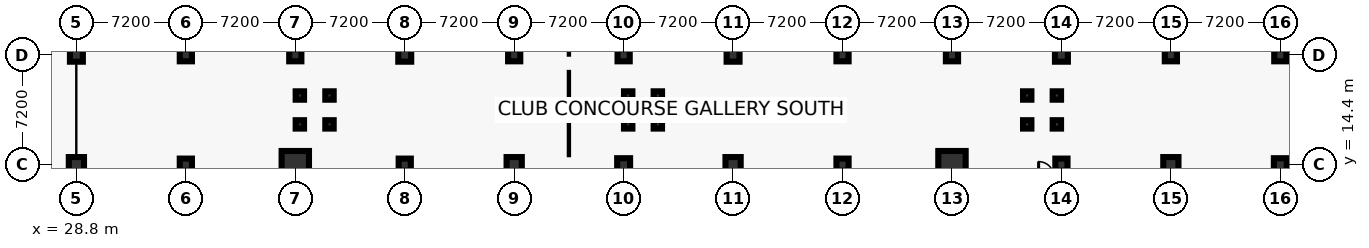
"""IFC4 building model, lengths in metres.
Left out: names, types, materials, properties, quantities, classifications, styles, units other than length and angle.
Written with IfcOpenShell. Run it as: python <this file> out.ifc"""

import sys

from ifc_helpers import new_model, si_unit, direction, frame, origin, origin_2d, place, context, subcontext, project, spatial, rectangle, circle, extrude, element, save


model = new_model("IFC4")
c1 = context("Model", 3, precision=1e-05, world=origin(), true_north=direction((0.0, 1.0)))
c2 = subcontext(c1, "Body", "Model", "MODEL_VIEW")
j1 = project(units=[si_unit("LENGTHUNIT", "METRE"), si_unit("PLANEANGLEUNIT", "RADIAN")], contexts=[c1])
p1 = place(None, origin())
s1 = spatial("IfcSite", under=j1, at=p1, CompositionType="ELEMENT")
p2 = place(p1, origin())
s2 = spatial("IfcBuilding", under=s1, at=p2, CompositionType="ELEMENT")
p3 = place(p2, frame((0.0, 0.0, 5.4)))
s3 = spatial("IfcBuildingStorey", under=s2, at=p3, CompositionType="ELEMENT", Elevation=5.4)
p4 = place(p3, frame((28.8, 14.4, 0.0), z_axis=(0.0, 0.0, 1.0), x_axis=(1.0, 0.0, 0.0)))
e1 = element("IfcColumn", 1, at=p4, inside=s3, PredefinedType="COLUMN", context=c2, shape_type="SweptSolid", body=[
    extrude(circle(Radius=0.5, at=origin_2d()), origin(), (0.0, 0.0, 1.0), 4.2),
])
p5 = place(p3, frame((28.8, 21.6, 0.0), z_axis=(0.0, 0.0, 1.0), x_axis=(1.0, 0.0, 0.0)))
e2 = element("IfcColumn", 2, at=p5, inside=s3, PredefinedType="COLUMN", context=c2, shape_type="SweptSolid", body=[
    extrude(rectangle(XDim=0.85, YDim=0.85, at=origin_2d()), origin(), (0.0, 0.0, 1.0), 4.2),
])
p6 = place(p3, frame((36.0, 14.4, 0.0), z_axis=(0.0, 0.0, 1.0), x_axis=(1.0, 0.0, 0.0)))
e3 = element("IfcColumn", 3, at=p6, inside=s3, PredefinedType="COLUMN", context=c2, shape_type="SweptSolid", body=[
    extrude(rectangle(XDim=0.8, YDim=0.8, at=origin_2d()), origin(), (0.0, 0.0, 1.0), 4.2),
])
p7 = place(p3, frame((36.0, 21.6, 0.0), z_axis=(0.0, 0.0, 1.0), x_axis=(1.0, 0.0, 0.0)))
e4 = element("IfcColumn", 4, at=p7, inside=s3, PredefinedType="COLUMN", context=c2, shape_type="SweptSolid", body=[
    extrude(circle(Radius=0.4, at=origin_2d()), origin(), (0.0, 0.0, 1.0), 4.2),
])
p8 = place(p3, frame((43.2, 14.4, 0.0), z_axis=(0.0, 0.0, 1.0), x_axis=(1.0, 0.0, 0.0)))
e5 = element("IfcColumn", 5, at=p8, inside=s3, PredefinedType="COLUMN", context=c2, shape_type="SweptSolid", body=[
    extrude(circle(Radius=0.9, at=origin_2d()), origin(), (0.0, 0.0, 1.0), 4.2),
])
p9 = place(p3, frame((43.2, 21.6, 0.0), z_axis=(0.0, 0.0, 1.0), x_axis=(1.0, 0.0, 0.0)))
e6 = element("IfcColumn", 6, at=p9, inside=s3, PredefinedType="COLUMN", context=c2, shape_type="SweptSolid", body=[
    extrude(rectangle(XDim=0.8, YDim=0.8, at=origin_2d()), origin(), (0.0, 0.0, 1.0), 4.2),
])
p10 = place(p3, frame((50.4, 14.4, 0.0), z_axis=(0.0, 0.0, 1.0), x_axis=(1.0, 0.0, 0.0)))
e7 = element("IfcColumn", 7, at=p10, inside=s3, PredefinedType="COLUMN", context=c2, shape_type="SweptSolid", body=[
    extrude(circle(Radius=0.4, at=origin_2d()), origin(), (0.0, 0.0, 1.0), 4.2),
])
p11 = place(p3, frame((50.4, 21.6, 0.0), z_axis=(0.0, 0.0, 1.0), x_axis=(1.0, 0.0, 0.0)))
e8 = element("IfcColumn", 8, at=p11, inside=s3, PredefinedType="COLUMN", context=c2, shape_type="SweptSolid", body=[
    extrude(rectangle(XDim=0.85, YDim=0.85, at=origin_2d()), origin(), (0.0, 0.0, 1.0), 4.2),
])
p12 = place(p3, frame((57.6, 14.4, 0.0), z_axis=(0.0, 0.0, 1.0), x_axis=(1.0, 0.0, 0.0)))
e9 = element("IfcColumn", 9, at=p12, inside=s3, PredefinedType="COLUMN", context=c2, shape_type="SweptSolid", body=[
    extrude(circle(Radius=0.5, at=origin_2d()), origin(), (0.0, 0.0, 1.0), 4.2),
])
p13 = place(p3, frame((57.6, 21.6, 0.0), z_axis=(0.0, 0.0, 1.0), x_axis=(1.0, 0.0, 0.0)))
e10 = element("IfcColumn", 10, at=p13, inside=s3, PredefinedType="COLUMN", context=c2, shape_type="SweptSolid", body=[
    extrude(circle(Radius=0.4, at=origin_2d()), origin(), (0.0, 0.0, 1.0), 4.2),
])
p14 = place(p3, frame((64.8, 14.4, 0.0), z_axis=(0.0, 0.0, 1.0), x_axis=(1.0, 0.0, 0.0)))
e11 = element("IfcColumn", 11, at=p14, inside=s3, PredefinedType="COLUMN", context=c2, shape_type="SweptSolid", body=[
    extrude(rectangle(XDim=0.85, YDim=0.85, at=origin_2d()), origin(), (0.0, 0.0, 1.0), 4.2),
])
p15 = place(p3, frame((64.8, 21.6, 0.0), z_axis=(0.0, 0.0, 1.0), x_axis=(1.0, 0.0, 0.0)))
e12 = element("IfcColumn", 12, at=p15, inside=s3, PredefinedType="COLUMN", context=c2, shape_type="SweptSolid", body=[
    extrude(rectangle(XDim=0.8, YDim=0.8, at=origin_2d()), origin(), (0.0, 0.0, 1.0), 4.2),
])
p16 = place(p3, frame((72.0, 14.4, 0.0), z_axis=(0.0, 0.0, 1.0), x_axis=(1.0, 0.0, 0.0)))
e13 = element("IfcColumn", 13, at=p16, inside=s3, PredefinedType="COLUMN", context=c2, shape_type="SweptSolid", body=[
    extrude(circle(Radius=0.5, at=origin_2d()), origin(), (0.0, 0.0, 1.0), 4.2),
])
p17 = place(p3, frame((72.0, 21.6, 0.0), z_axis=(0.0, 0.0, 1.0), x_axis=(1.0, 0.0, 0.0)))
e14 = element("IfcColumn", 14, at=p17, inside=s3, PredefinedType="COLUMN", context=c2, shape_type="SweptSolid", body=[
    extrude(rectangle(XDim=0.85, YDim=0.85, at=origin_2d()), origin(), (0.0, 0.0, 1.0), 4.2),
])
p18 = place(p3, frame((79.2, 14.4, 0.0), z_axis=(0.0, 0.0, 1.0), x_axis=(1.0, 0.0, 0.0)))
e15 = element("IfcColumn", 15, at=p18, inside=s3, PredefinedType="COLUMN", context=c2, shape_type="SweptSolid", body=[
    extrude(rectangle(XDim=0.8, YDim=0.8, at=origin_2d()), origin(), (0.0, 0.0, 1.0), 4.2),
])
p19 = place(p3, frame((79.2, 21.6, 0.0), z_axis=(0.0, 0.0, 1.0), x_axis=(1.0, 0.0, 0.0)))
e16 = element("IfcColumn", 16, at=p19, inside=s3, PredefinedType="COLUMN", context=c2, shape_type="SweptSolid", body=[
    extrude(circle(Radius=0.4, at=origin_2d()), origin(), (0.0, 0.0, 1.0), 4.2),
])
p20 = place(p3, frame((86.4, 14.4, 0.0), z_axis=(0.0, 0.0, 1.0), x_axis=(1.0, 0.0, 0.0)))
e17 = element("IfcColumn", 17, at=p20, inside=s3, PredefinedType="COLUMN", context=c2, shape_type="SweptSolid", body=[
    extrude(circle(Radius=0.9, at=origin_2d()), origin(), (0.0, 0.0, 1.0), 4.2),
])
p21 = place(p3, frame((86.4, 21.6, 0.0), z_axis=(0.0, 0.0, 1.0), x_axis=(1.0, 0.0, 0.0)))
e18 = element("IfcColumn", 18, at=p21, inside=s3, PredefinedType="COLUMN", context=c2, shape_type="SweptSolid", body=[
    extrude(rectangle(XDim=0.8, YDim=0.8, at=origin_2d()), origin(), (0.0, 0.0, 1.0), 4.2),
])
p22 = place(p3, frame((93.6, 14.4, 0.0), z_axis=(0.0, 0.0, 1.0), x_axis=(1.0, 0.0, 0.0)))
e19 = element("IfcColumn", 19, at=p22, inside=s3, PredefinedType="COLUMN", context=c2, shape_type="SweptSolid", body=[
    extrude(circle(Radius=0.4, at=origin_2d()), origin(), (0.0, 0.0, 1.0), 4.2),
])
p23 = place(p3, frame((93.6, 21.6, 0.0), z_axis=(0.0, 0.0, 1.0), x_axis=(1.0, 0.0, 0.0)))
e20 = element("IfcColumn", 20, at=p23, inside=s3, PredefinedType="COLUMN", context=c2, shape_type="SweptSolid", body=[
    extrude(rectangle(XDim=0.85, YDim=0.85, at=origin_2d()), origin(), (0.0, 0.0, 1.0), 4.2),
])
p24 = place(p3, frame((100.8, 14.4, 0.0), z_axis=(0.0, 0.0, 1.0), x_axis=(1.0, 0.0, 0.0)))
e21 = element("IfcColumn", 21, at=p24, inside=s3, PredefinedType="COLUMN", context=c2, shape_type="SweptSolid", body=[
    extrude(circle(Radius=0.5, at=origin_2d()), origin(), (0.0, 0.0, 1.0), 4.2),
])
p25 = place(p3, frame((100.8, 21.6, 0.0), z_axis=(0.0, 0.0, 1.0), x_axis=(1.0, 0.0, 0.0)))
e22 = element("IfcColumn", 22, at=p25, inside=s3, PredefinedType="COLUMN", context=c2, shape_type="SweptSolid", body=[
    extrude(circle(Radius=0.4, at=origin_2d()), origin(), (0.0, 0.0, 1.0), 4.2),
])
p26 = place(p3, frame((108.0, 14.4, 0.0), z_axis=(0.0, 0.0, 1.0), x_axis=(1.0, 0.0, 0.0)))
e23 = element("IfcColumn", 23, at=p26, inside=s3, PredefinedType="COLUMN", context=c2, shape_type="SweptSolid", body=[
    extrude(rectangle(XDim=0.85, YDim=0.85, at=origin_2d()), origin(), (0.0, 0.0, 1.0), 4.2),
])
p27 = place(p3, frame((108.0, 21.6, 0.0), z_axis=(0.0, 0.0, 1.0), x_axis=(1.0, 0.0, 0.0)))
e24 = element("IfcColumn", 24, at=p27, inside=s3, PredefinedType="COLUMN", context=c2, shape_type="SweptSolid", body=[
    extrude(rectangle(XDim=0.8, YDim=0.8, at=origin_2d()), origin(), (0.0, 0.0, 1.0), 4.2),
])
for number, where, z_axis, x_axis in (
    (25, (43.5, 17.05, 0.0), (0.0, 0.0, 1.0), (1.0, 0.0, 0.0)),
    (26, (45.45, 17.05, 0.0), (0.0, 0.0, 1.0), (1.0, 0.0, 0.0)),
    (27, (43.5, 18.95, 0.0), (0.0, 0.0, 1.0), (1.0, 0.0, 0.0)),
    (28, (45.45, 18.95, 0.0), (0.0, 0.0, 1.0), (1.0, 0.0, 0.0)),
    (29, (65.1, 17.05, 0.0), (0.0, 0.0, 1.0), (1.0, 0.0, 0.0)),
    (30, (67.05, 17.05, 0.0), (0.0, 0.0, 1.0), (1.0, 0.0, 0.0)),
    (31, (65.1, 18.95, 0.0), (0.0, 0.0, 1.0), (1.0, 0.0, 0.0)),
    (32, (67.05, 18.95, 0.0), (0.0, 0.0, 1.0), (1.0, 0.0, 0.0)),
    (33, (91.35, 17.05, 0.0), (0.0, 0.0, 1.0), (1.0, 0.0, 0.0)),
    (34, (93.3, 17.05, 0.0), (0.0, 0.0, 1.0), (1.0, 0.0, 0.0)),
    (35, (91.35, 18.95, 0.0), (0.0, 0.0, 1.0), (1.0, 0.0, 0.0)),
    (36, (93.3, 18.95, 0.0), (0.0, 0.0, 1.0), (1.0, 0.0, 0.0)),
):
    element("IfcColumn", number, at=place(p3, frame(where, z_axis=z_axis, x_axis=x_axis)), inside=s3, PredefinedType="COLUMN", context=c2, shape_type="SweptSolid", body=[
        extrude(rectangle(XDim=0.55, YDim=0.55, at=origin_2d()), origin(), (0.0, 0.0, 1.0), 4.2),
    ])
save(model, sys.argv[1])
